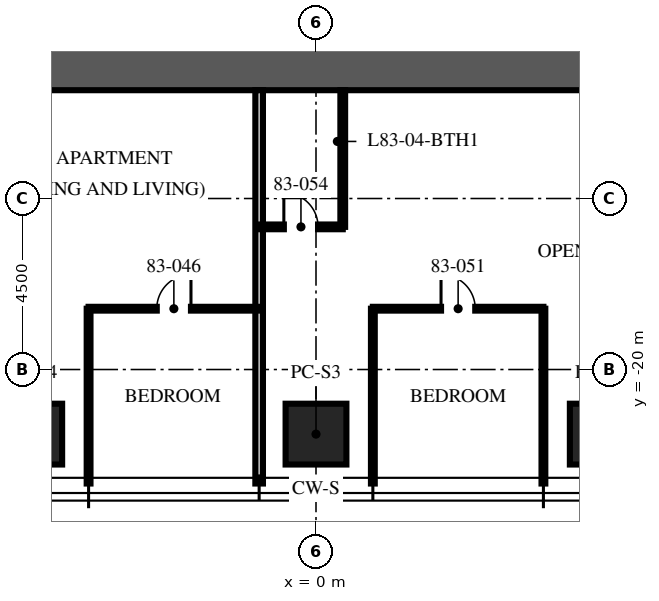
"""IFC4 building model, lengths in metres.
Left out: names, types, materials, properties, quantities, classifications, styles, units other than length and angle.
Written with IfcOpenShell. Run it as: python <this file> out.ifc"""

import sys

from ifc_helpers import new_model, si_unit, direction, frame, frame_2d, origin, origin_2d, place, context, subcontext, project, spatial, rectangle, extrude, element, fill, save


model = new_model("IFC4")
c1 = context("Model", 3, precision=1e-05, world=origin(), true_north=direction((0.0, 1.0)))
c2 = subcontext(c1, "Body", "Model", "MODEL_VIEW")
j1 = project(units=[si_unit("LENGTHUNIT", "METRE"), si_unit("PLANEANGLEUNIT", "RADIAN")], contexts=[c1])
p1 = place(None, origin())
s1 = spatial("IfcSite", under=j1, at=p1, CompositionType="ELEMENT")
p2 = place(p1, origin())
s2 = spatial("IfcBuilding", under=s1, at=p2, CompositionType="ELEMENT")
p3 = place(p2, frame((0.0, 0.0, 330.75)))
s3 = spatial("IfcBuildingStorey", under=s2, at=p3, CompositionType="ELEMENT", Elevation=330.75)
p4 = place(p3, frame((-15.5, -12.0, -0.25), z_axis=(0.0, 0.0, 1.0), x_axis=(1.0, 0.0, 0.0)))
e1 = element("IfcWall", 1, at=p4, inside=s3, PredefinedType="SHEAR", context=c2, shape_type="SweptSolid", body=[
    extrude(rectangle(XDim=31.0, YDim=1.3, at=frame_2d((15.5, 0.0))), origin(), (0.0, 0.0, 1.0), 3.75),
])
for number, where, z_axis, x_axis in (
    (2, (7.48, -21.7, 0.0), (0.0, 0.0, 1.0), (1.0, 0.0, 0.0)),
    (3, (0.0, -21.7, 0.0), (0.0, 0.0, 1.0), (1.0, 0.0, 0.0)),
    (4, (-7.48, -21.7, 0.0), (0.0, 0.0, 1.0), (1.0, 0.0, 0.0)),
):
    element("IfcColumn", number, at=place(p3, frame(where, z_axis=z_axis, x_axis=x_axis)), inside=s3, PredefinedType="COLUMN", context=c2, shape_type="SweptSolid", body=[
        extrude(rectangle(XDim=1.6, YDim=1.6, at=origin_2d()), origin(), (0.0, 0.0, 1.0), 3.75),
    ])
p5 = place(p3, frame((-5.984, -18.4, 0.0), z_axis=(0.0, 0.0, 1.0), x_axis=(0.0, -1.0, 0.0)))
e5 = element("IfcWall", 5, at=p5, inside=s3, PredefinedType="PARTITIONING", context=c2, shape_type="SweptSolid", body=[
    extrude(rectangle(XDim=4.6, YDim=0.1, at=frame_2d((2.3, 0.0))), origin(), (0.0, 0.0, 1.0), 3.01),
])
p6 = place(p3, frame((-1.496, -12.65, 0.0), z_axis=(0.0, 0.0, 1.0), x_axis=(0.0, -1.0, 0.0)))
e6 = element("IfcWall", 6, at=p6, inside=s3, PredefinedType="PARTITIONING", context=c2, shape_type="SweptSolid", body=[
    extrude(rectangle(XDim=10.35, YDim=0.2, at=frame_2d((5.175, 0.0))), origin(), (0.0, 0.0, 1.0), 3.01),
])
for number, where, z_axis, x_axis in (
    (7, (1.496, -18.4, 0.0), (0.0, 0.0, 1.0), (0.0, -1.0, 0.0)),
    (8, (5.984, -18.4, 0.0), (0.0, 0.0, 1.0), (0.0, -1.0, 0.0)),
):
    element("IfcWall", number, at=place(p3, frame(where, z_axis=z_axis, x_axis=x_axis)), inside=s3, PredefinedType="PARTITIONING", context=c2, shape_type="SweptSolid", body=[
        extrude(rectangle(XDim=4.6, YDim=0.1, at=frame_2d((2.3, 0.0))), origin(), (0.0, 0.0, 1.0), 3.01),
    ])
p7 = place(p3, frame((-5.984, -18.4, 0.0), z_axis=(0.0, 0.0, 1.0), x_axis=(1.0, 0.0, 0.0)))
e9 = element("IfcWall", 9, at=p7, inside=s3, PredefinedType="PARTITIONING", context=c2, shape_type="SweptSolid", body=[
    extrude(rectangle(XDim=4.488, YDim=0.1, at=frame_2d((2.244, 0.0))), origin(), (0.0, 0.0, 1.0), 2.91),
])
p8 = place(p7, frame((1.794, 0.0, 0.0)))
e10 = element("IfcOpeningElement", 10, at=p8, cuts=e9, PredefinedType="OPENING", context=c2, shape_type="SweptSolid", body=[
    extrude(rectangle(XDim=0.9, YDim=2.1, at=frame_2d((0.45, 1.05))), frame((0.0, 0.06, 0.0), z_axis=(0.0, -1.0, 0.0), x_axis=(1.0, 0.0, 0.0)), (0.0, 0.0, 1.0), 0.12),
])
p9 = place(p3, frame((1.496, -18.4, 0.0), z_axis=(0.0, 0.0, 1.0), x_axis=(1.0, 0.0, 0.0)))
e11 = element("IfcWall", 11, at=p9, inside=s3, PredefinedType="PARTITIONING", context=c2, shape_type="SweptSolid", body=[
    extrude(rectangle(XDim=4.488, YDim=0.1, at=frame_2d((2.244, 0.0))), origin(), (0.0, 0.0, 1.0), 2.91),
])
p10 = place(p9, frame((1.794, 0.0, 0.0)))
e12 = element("IfcOpeningElement", 12, at=p10, cuts=e11, PredefinedType="OPENING", context=c2, shape_type="SweptSolid", body=[
    extrude(rectangle(XDim=0.9, YDim=2.1, at=frame_2d((0.45, 1.05))), frame((0.0, 0.06, 0.0), z_axis=(0.0, -1.0, 0.0), x_axis=(1.0, 0.0, 0.0)), (0.0, 0.0, 1.0), 0.12),
])
p11 = place(p3, frame((-1.496, -16.246, 0.0), z_axis=(0.0, 0.0, 1.0), x_axis=(1.0, 0.0, 0.0)))
e13 = element("IfcWall", 13, at=p11, inside=s3, PredefinedType="PARTITIONING", context=c2, shape_type="SweptSolid", body=[
    extrude(rectangle(XDim=2.2, YDim=0.125, at=frame_2d((1.1, 0.0))), origin(), (0.0, 0.0, 1.0), 2.9),
])
p12 = place(p11, frame((0.65, 0.0, 0.0)))
e14 = element("IfcOpeningElement", 14, at=p12, cuts=e13, PredefinedType="OPENING", context=c2, shape_type="SweptSolid", body=[
    extrude(rectangle(XDim=0.9, YDim=2.1, at=frame_2d((0.45, 1.05))), frame((0.0, 0.073, 0.0), z_axis=(0.0, -1.0, 0.0), x_axis=(1.0, 0.0, 0.0)), (0.0, 0.0, 1.0), 0.145),
])
p13 = place(p3, frame((0.704, -12.65, 0.0), z_axis=(0.0, 0.0, 1.0), x_axis=(0.0, -1.0, 0.0)))
e15 = element("IfcWall", 15, at=p13, inside=s3, PredefinedType="PARTITIONING", context=c2, shape_type="SweptSolid", body=[
    extrude(rectangle(XDim=3.596, YDim=0.125, at=frame_2d((1.798, 0.0))), origin(), (0.0, 0.0, 1.0), 3.5),
])
p14 = place(p8, origin())
e16 = element("IfcDoor", 16, at=p14, inside=s3, OperationType="SINGLE_SWING_RIGHT", PredefinedType="DOOR", context=c2, shape_type="SweptSolid", body=[
    extrude(rectangle(XDim=0.9, YDim=2.1, at=frame_2d((0.45, 1.05))), frame((0.0, 0.025, 0.0), z_axis=(0.0, -1.0, 0.0), x_axis=(1.0, 0.0, 0.0)), (0.0, 0.0, 1.0), 0.05),
])
fill(e10, e16)
p15 = place(p10, origin())
e17 = element("IfcDoor", 17, at=p15, inside=s3, OperationType="SINGLE_SWING_LEFT", PredefinedType="DOOR", context=c2, shape_type="SweptSolid", body=[
    extrude(rectangle(XDim=0.9, YDim=2.1, at=frame_2d((0.45, 1.05))), frame((0.0, 0.025, 0.0), z_axis=(0.0, -1.0, 0.0), x_axis=(1.0, 0.0, 0.0)), (0.0, 0.0, 1.0), 0.05),
])
fill(e12, e17)
p16 = place(p12, origin())
e18 = element("IfcDoor", 18, at=p16, inside=s3, OperationType="SINGLE_SWING_LEFT", PredefinedType="DOOR", context=c2, shape_type="SweptSolid", body=[
    extrude(rectangle(XDim=0.9, YDim=2.1, at=frame_2d((0.45, 1.05))), frame((0.0, 0.025, 0.0), z_axis=(0.0, -1.0, 0.0), x_axis=(1.0, 0.0, 0.0)), (0.0, 0.0, 1.0), 0.05),
])
fill(e14, e18)
save(model, sys.argv[1])
